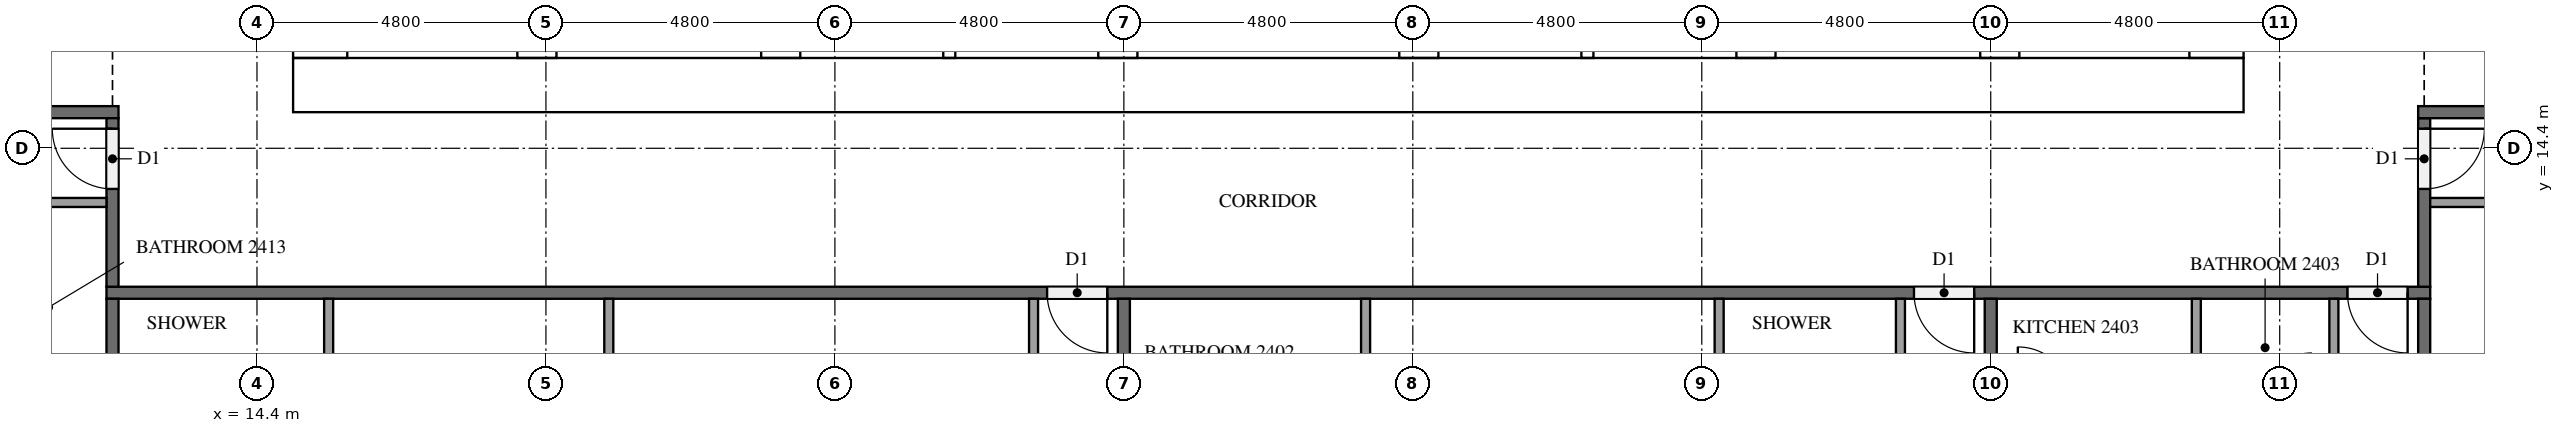
"""IFC4 building model, lengths in metres.
Left out: names, types, materials, properties, quantities, classifications, styles, units other than length and angle.
Written with IfcOpenShell. Run it as: python <this file> out.ifc"""

import sys

from ifc_helpers import new_model, si_unit, direction, frame, frame_2d, origin, place, context, subcontext, project, spatial, rectangle, extrude, element, fill, save


model = new_model("IFC4")
c1 = context("Model", 3, precision=1e-05, world=origin(), true_north=direction((0.0, 1.0)))
c2 = subcontext(c1, "Body", "Model", "MODEL_VIEW")
j1 = project(units=[si_unit("LENGTHUNIT", "METRE"), si_unit("PLANEANGLEUNIT", "RADIAN")], contexts=[c1])
p1 = place(None, origin())
s1 = spatial("IfcSite", under=j1, at=p1, CompositionType="ELEMENT")
p2 = place(p1, origin())
s2 = spatial("IfcBuilding", under=s1, at=p2, CompositionType="ELEMENT")
p3 = place(p2, frame((0.0, 0.0, 96.2)))
s3 = spatial("IfcBuildingStorey", under=s2, at=p3, CompositionType="ELEMENT", Elevation=96.2)
p4 = place(p3, frame((15.0, 15.45, 0.0), z_axis=(0.0, 0.0, 1.0), x_axis=(1.0, 0.0, 0.0)))
e1 = element("IfcWall", 1, at=p4, inside=s3, PredefinedType="SHEAR", context=c2, shape_type="SweptSolid", body=[
    extrude(rectangle(XDim=32.4, YDim=0.9, at=frame_2d((16.2, 0.0))), origin(), (0.0, 0.0, 1.0), 3.2),
])
p5 = place(p4, frame((15.3, 0.0, 0.0)))
e2 = element("IfcOpeningElement", 2, at=p5, cuts=e1, PredefinedType="OPENING", context=c2, shape_type="SweptSolid", body=[
    extrude(rectangle(XDim=1.8, YDim=2.1, at=frame_2d((0.9, 1.05))), frame((0.0, 0.46, 0.0), z_axis=(0.0, -1.0, 0.0), x_axis=(1.0, 0.0, 0.0)), (0.0, 0.0, 1.0), 0.92),
])
p6 = place(p3, frame((15.45, 15.9, 0.0), z_axis=(0.0, 0.0, 1.0), x_axis=(0.0, 1.0, 0.0)))
e3 = element("IfcWall", 3, at=p6, inside=s3, PredefinedType="SHEAR", context=c2, shape_type="SweptSolid", body=[
    extrude(rectangle(XDim=21.0, YDim=0.9, at=frame_2d((10.5, 0.0))), origin(), (0.0, 0.0, 1.0), 3.2),
])
p7 = place(p6, frame((4.86, 0.0, 0.0)))
e4 = element("IfcOpeningElement", 4, at=p7, cuts=e3, PredefinedType="OPENING", context=c2, shape_type="SweptSolid", body=[
    extrude(rectangle(XDim=1.2, YDim=2.1, at=frame_2d((0.6, 1.05))), frame((0.0, 0.46, 0.0), z_axis=(0.0, -1.0, 0.0), x_axis=(1.0, 0.0, 0.0)), (0.0, 0.0, 1.0), 0.92),
])
p8 = place(p3, frame((46.95, 15.9, 0.0), z_axis=(0.0, 0.0, 1.0), x_axis=(0.0, 1.0, 0.0)))
e5 = element("IfcWall", 5, at=p8, inside=s3, PredefinedType="SHEAR", context=c2, shape_type="SweptSolid", body=[
    extrude(rectangle(XDim=21.0, YDim=0.9, at=frame_2d((10.5, 0.0))), origin(), (0.0, 0.0, 1.0), 3.2),
])
p9 = place(p8, frame((10.2, 0.0, 0.0)))
e6 = element("IfcOpeningElement", 6, at=p9, cuts=e5, PredefinedType="OPENING", context=c2, shape_type="SweptSolid", body=[
    extrude(rectangle(XDim=1.2, YDim=2.1, at=frame_2d((0.6, 1.05))), frame((0.0, 0.46, 0.0), z_axis=(0.0, -1.0, 0.0), x_axis=(1.0, 0.0, 0.0)), (0.0, 0.0, 1.0), 0.92),
])
p10 = place(p3, frame((19.05, 15.9, 0.0), z_axis=(0.0, 0.0, 1.0), x_axis=(0.0, 1.0, 0.0)))
e7 = element("IfcWall", 7, at=p10, inside=s3, PredefinedType="SHEAR", context=c2, shape_type="SweptSolid", body=[
    extrude(rectangle(XDim=15.025, YDim=0.65, at=frame_2d((7.513, 0.0))), origin(), (0.0, 0.0, 1.0), 3.2),
])
p11 = place(p10, frame((9.55, 0.0, 0.0)))
e8 = element("IfcOpeningElement", 8, at=p11, cuts=e7, PredefinedType="OPENING", context=c2, shape_type="SweptSolid", body=[
    extrude(rectangle(XDim=1.1, YDim=2.1, at=frame_2d((0.55, 1.05))), frame((0.0, 0.335, 0.0), z_axis=(0.0, -1.0, 0.0), x_axis=(1.0, 0.0, 0.0)), (0.0, 0.0, 1.0), 0.67),
])
p12 = place(p10, frame((13.05, 0.0, 0.0)))
e9 = element("IfcOpeningElement", 9, at=p12, cuts=e7, PredefinedType="OPENING", context=c2, shape_type="SweptSolid", body=[
    extrude(rectangle(XDim=1.1, YDim=2.1, at=frame_2d((0.55, 1.05))), frame((0.0, 0.335, 0.0), z_axis=(0.0, -1.0, 0.0), x_axis=(1.0, 0.0, 0.0)), (0.0, 0.0, 1.0), 0.67),
])
p13 = place(p10, frame((0.3, 0.0, 0.0)))
e10 = element("IfcOpeningElement", 10, at=p13, cuts=e7, PredefinedType="OPENING", context=c2, shape_type="SweptSolid", body=[
    extrude(rectangle(XDim=1.2, YDim=2.1, at=frame_2d((0.6, 1.05))), frame((0.0, 0.335, 0.0), z_axis=(0.0, -1.0, 0.0), x_axis=(1.0, 0.0, 0.0)), (0.0, 0.0, 1.0), 0.67),
])
p14 = place(p3, frame((23.1, 15.9, 0.0), z_axis=(0.0, 0.0, 1.0), x_axis=(0.0, 1.0, 0.0)))
e11 = element("IfcWall", 11, at=p14, inside=s3, PredefinedType="SHEAR", context=c2, shape_type="SweptSolid", body=[
    extrude(rectangle(XDim=21.0, YDim=0.65, at=frame_2d((10.5, 0.0))), origin(), (0.0, 0.0, 1.0), 3.2),
])
p15 = place(p3, frame((39.3, 15.9, 0.0), z_axis=(0.0, 0.0, 1.0), x_axis=(0.0, 1.0, 0.0)))
e12 = element("IfcWall", 12, at=p15, inside=s3, PredefinedType="SHEAR", context=c2, shape_type="SweptSolid", body=[
    extrude(rectangle(XDim=8.35, YDim=0.65, at=frame_2d((4.175, 0.0))), origin(), (0.0, 0.0, 1.0), 3.2),
])
p16 = place(p3, frame((43.35, 15.9, 0.0), z_axis=(0.0, 0.0, 1.0), x_axis=(0.0, 1.0, 0.0)))
e13 = element("IfcWall", 13, at=p16, inside=s3, PredefinedType="SHEAR", context=c2, shape_type="SweptSolid", body=[
    extrude(rectangle(XDim=8.35, YDim=0.65, at=frame_2d((4.175, 0.0))), origin(), (0.0, 0.0, 1.0), 3.2),
])
p17 = place(p16, frame((0.3, 0.0, 0.0)))
e14 = element("IfcOpeningElement", 14, at=p17, cuts=e13, PredefinedType="OPENING", context=c2, shape_type="SweptSolid", body=[
    extrude(rectangle(XDim=1.2, YDim=2.1, at=frame_2d((0.6, 1.05))), frame((0.0, 0.335, 0.0), z_axis=(0.0, -1.0, 0.0), x_axis=(1.0, 0.0, 0.0)), (0.0, 0.0, 1.0), 0.67),
])
for number, where, z_axis, x_axis in (
    (15, (28.7, 15.9, 0.0), (0.0, 0.0, 1.0), (0.0, 1.0, 0.0)),
    (16, (33.7, 15.9, 0.0), (0.0, 0.0, 1.0), (0.0, 1.0, 0.0)),
):
    element("IfcWall", number, at=place(p3, frame(where, z_axis=z_axis, x_axis=x_axis)), inside=s3, PredefinedType="SHEAR", context=c2, shape_type="SweptSolid", body=[
        extrude(rectangle(XDim=2.525, YDim=0.65, at=frame_2d((1.263, 0.0))), origin(), (0.0, 0.0, 1.0), 3.2),
    ])
for number, where, z_axis, x_axis in (
    (17, (25.9, 15.9, 0.0), (0.0, 0.0, 1.0), (0.0, 1.0, 0.0)),
    (18, (36.5, 15.9, 0.0), (0.0, 0.0, 1.0), (0.0, 1.0, 0.0)),
):
    element("IfcWall", number, at=place(p3, frame(where, z_axis=z_axis, x_axis=x_axis)), inside=s3, PredefinedType="SOLIDWALL", context=c2, shape_type="SweptSolid", body=[
        extrude(rectangle(XDim=2.525, YDim=0.2, at=frame_2d((1.263, 0.0))), origin(), (0.0, 0.0, 1.0), 3.2),
    ])
p18 = place(p3, frame((50.5, 12.0, 0.0), z_axis=(0.0, 0.0, 1.0), x_axis=(-1.0, 0.0, 0.0)))
e19 = element("IfcWall", 19, at=p18, inside=s3, PredefinedType="PARTITIONING", context=c2, shape_type="SweptSolid", body=[
    extrude(rectangle(XDim=38.6, YDim=0.2, at=frame_2d((19.3, 0.0))), origin(), (0.0, 0.0, 1.0), 3.2),
])
p19 = place(p18, frame((21.975, 0.0, 0.0)))
e20 = element("IfcOpeningElement", 20, at=p19, cuts=e19, PredefinedType="OPENING", context=c2, shape_type="SweptSolid", body=[
    extrude(rectangle(XDim=1.0, YDim=2.1, at=frame_2d((0.5, 1.05))), frame((0.0, 0.11, 0.0), z_axis=(0.0, -1.0, 0.0), x_axis=(1.0, 0.0, 0.0)), (0.0, 0.0, 1.0), 0.22),
])
p20 = place(p18, frame((7.575, 0.0, 0.0)))
e21 = element("IfcOpeningElement", 21, at=p20, cuts=e19, PredefinedType="OPENING", context=c2, shape_type="SweptSolid", body=[
    extrude(rectangle(XDim=1.0, YDim=2.1, at=frame_2d((0.5, 1.05))), frame((0.0, 0.11, 0.0), z_axis=(0.0, -1.0, 0.0), x_axis=(1.0, 0.0, 0.0)), (0.0, 0.0, 1.0), 0.22),
])
p21 = place(p18, frame((0.375, 0.0, 0.0)))
e22 = element("IfcOpeningElement", 22, at=p21, cuts=e19, PredefinedType="OPENING", context=c2, shape_type="SweptSolid", body=[
    extrude(rectangle(XDim=1.0, YDim=2.1, at=frame_2d((0.5, 1.05))), frame((0.0, 0.11, 0.0), z_axis=(0.0, -1.0, 0.0), x_axis=(1.0, 0.0, 0.0)), (0.0, 0.0, 1.0), 0.22),
])
p22 = place(p3, frame((50.4, 14.9, 0.0), z_axis=(0.0, 0.0, 1.0), x_axis=(0.0, -1.0, 0.0)))
e23 = element("IfcWall", 23, at=p22, inside=s3, PredefinedType="PARTITIONING", context=c2, shape_type="SweptSolid", body=[
    extrude(rectangle(XDim=2.8, YDim=0.2, at=frame_2d((1.4, 0.0))), origin(), (0.0, 0.0, 1.0), 3.2),
])
p23 = place(p22, frame((0.175, 0.0, 0.0)))
e24 = element("IfcOpeningElement", 24, at=p23, cuts=e23, PredefinedType="OPENING", context=c2, shape_type="SweptSolid", body=[
    extrude(rectangle(XDim=1.0, YDim=2.1, at=frame_2d((0.5, 1.05))), frame((0.0, 0.11, 0.0), z_axis=(0.0, -1.0, 0.0), x_axis=(1.0, 0.0, 0.0)), (0.0, 0.0, 1.0), 0.22),
])
p24 = place(p3, frame((50.3, 15.0, 0.0), z_axis=(0.0, 0.0, 1.0), x_axis=(1.0, 0.0, 0.0)))
e25 = element("IfcWall", 25, at=p24, inside=s3, PredefinedType="PARTITIONING", context=c2, shape_type="SweptSolid", body=[
    extrude(rectangle(XDim=2.2, YDim=0.2, at=frame_2d((1.1, 0.0))), origin(), (0.0, 0.0, 1.0), 3.2),
])
p25 = place(p3, frame((9.9, 15.0, 0.0), z_axis=(0.0, 0.0, 1.0), x_axis=(1.0, 0.0, 0.0)))
e26 = element("IfcWall", 26, at=p25, inside=s3, PredefinedType="PARTITIONING", context=c2, shape_type="SweptSolid", body=[
    extrude(rectangle(XDim=2.2, YDim=0.2, at=frame_2d((1.1, 0.0))), origin(), (0.0, 0.0, 1.0), 3.2),
])
p26 = place(p3, frame((12.0, 12.1, 0.0), z_axis=(0.0, 0.0, 1.0), x_axis=(0.0, 1.0, 0.0)))
e27 = element("IfcWall", 27, at=p26, inside=s3, PredefinedType="PARTITIONING", context=c2, shape_type="SweptSolid", body=[
    extrude(rectangle(XDim=2.8, YDim=0.2, at=frame_2d((1.4, 0.0))), origin(), (0.0, 0.0, 1.0), 3.2),
])
p27 = place(p26, frame((1.625, 0.0, 0.0)))
e28 = element("IfcOpeningElement", 28, at=p27, cuts=e27, PredefinedType="OPENING", context=c2, shape_type="SweptSolid", body=[
    extrude(rectangle(XDim=1.0, YDim=2.1, at=frame_2d((0.5, 1.05))), frame((0.0, 0.11, 0.0), z_axis=(0.0, -1.0, 0.0), x_axis=(1.0, 0.0, 0.0)), (0.0, 0.0, 1.0), 0.22),
])
p28 = place(p3, frame((28.8, 11.9, 0.0), z_axis=(0.0, 0.0, 1.0), x_axis=(0.0, -1.0, 0.0)))
e29 = element("IfcWall", 29, at=p28, inside=s3, PredefinedType="PARTITIONING", context=c2, shape_type="SweptSolid", body=[
    extrude(rectangle(XDim=6.675, YDim=0.2, at=frame_2d((3.337, 0.0))), origin(), (0.0, 0.0, 1.0), 3.2),
])
for number, where, z_axis, x_axis in (
    (30, (12.0, 4.9, 0.0), (0.0, 0.0, 1.0), (0.0, 1.0, 0.0)),
    (31, (43.2, 11.9, 0.0), (0.0, 0.0, 1.0), (0.0, -1.0, 0.0)),
    (32, (50.4, 11.9, 0.0), (0.0, 0.0, 1.0), (0.0, -1.0, 0.0)),
):
    element("IfcWall", number, at=place(p3, frame(where, z_axis=z_axis, x_axis=x_axis)), inside=s3, PredefinedType="PARTITIONING", context=c2, shape_type="SweptSolid", body=[
        extrude(rectangle(XDim=7.0, YDim=0.2, at=frame_2d((3.5, 0.0))), origin(), (0.0, 0.0, 1.0), 3.2),
    ])
for number, where, z_axis, x_axis in (
    (33, (20.244, 11.9, 0.0), (0.0, 0.0, 1.0), (0.0, -1.0, 0.0)),
    (34, (15.59, 11.9, 0.0), (0.0, 0.0, 1.0), (0.0, -1.0, 0.0)),
):
    element("IfcWall", number, at=place(p3, frame(where, z_axis=z_axis, x_axis=x_axis)), inside=s3, PredefinedType="PARTITIONING", context=c2, shape_type="SweptSolid", body=[
        extrude(rectangle(XDim=2.225, YDim=0.15, at=frame_2d((1.112, 0.0))), origin(), (0.0, 0.0, 1.0), 3.2),
    ])
p29 = place(p3, frame((27.3, 11.9, 0.0), z_axis=(0.0, 0.0, 1.0), x_axis=(0.0, -1.0, 0.0)))
e35 = element("IfcWall", 35, at=p29, inside=s3, PredefinedType="PARTITIONING", context=c2, shape_type="SweptSolid", body=[
    extrude(rectangle(XDim=2.375, YDim=0.15, at=frame_2d((1.188, 0.0))), origin(), (0.0, 0.0, 1.0), 3.2),
])
for number, where, z_axis, x_axis in (
    (36, (38.688, 11.9, 0.0), (0.0, 0.0, 1.0), (0.0, -1.0, 0.0)),
    (37, (32.815, 11.9, 0.0), (0.0, 0.0, 1.0), (0.0, -1.0, 0.0)),
):
    element("IfcWall", number, at=place(p3, frame(where, z_axis=z_axis, x_axis=x_axis)), inside=s3, PredefinedType="PARTITIONING", context=c2, shape_type="SweptSolid", body=[
        extrude(rectangle(XDim=2.225, YDim=0.15, at=frame_2d((1.112, 0.0))), origin(), (0.0, 0.0, 1.0), 3.2),
    ])
p30 = place(p3, frame((41.7, 11.9, 0.0), z_axis=(0.0, 0.0, 1.0), x_axis=(0.0, -1.0, 0.0)))
e38 = element("IfcWall", 38, at=p30, inside=s3, PredefinedType="PARTITIONING", context=c2, shape_type="SweptSolid", body=[
    extrude(rectangle(XDim=2.375, YDim=0.15, at=frame_2d((1.188, 0.0))), origin(), (0.0, 0.0, 1.0), 3.2),
])
p31 = place(p3, frame((46.615, 11.9, 0.0), z_axis=(0.0, 0.0, 1.0), x_axis=(0.0, -1.0, 0.0)))
e39 = element("IfcWall", 39, at=p31, inside=s3, PredefinedType="PARTITIONING", context=c2, shape_type="SweptSolid", body=[
    extrude(rectangle(XDim=1.625, YDim=0.15, at=frame_2d((0.812, 0.0))), origin(), (0.0, 0.0, 1.0), 3.2),
])
p32 = place(p3, frame((48.9, 11.9, 0.0), z_axis=(0.0, 0.0, 1.0), x_axis=(0.0, -1.0, 0.0)))
e40 = element("IfcWall", 40, at=p32, inside=s3, PredefinedType="PARTITIONING", context=c2, shape_type="SweptSolid", body=[
    extrude(rectangle(XDim=1.775, YDim=0.15, at=frame_2d((0.887, 0.0))), origin(), (0.0, 0.0, 1.0), 3.2),
])
p33 = place(p3, frame((50.5, 13.5, 0.0), z_axis=(0.0, 0.0, 1.0), x_axis=(1.0, 0.0, 0.0)))
e41 = element("IfcWall", 41, at=p33, inside=s3, PredefinedType="PARTITIONING", context=c2, shape_type="SweptSolid", body=[
    extrude(rectangle(XDim=3.125, YDim=0.15, at=frame_2d((1.562, 0.0))), origin(), (0.0, 0.0, 1.0), 3.2),
])
p34 = place(p3, frame((11.9, 13.5, 0.0), z_axis=(0.0, 0.0, 1.0), x_axis=(-1.0, 0.0, 0.0)))
e42 = element("IfcWall", 42, at=p34, inside=s3, PredefinedType="PARTITIONING", context=c2, shape_type="SweptSolid", body=[
    extrude(rectangle(XDim=2.075, YDim=0.15, at=frame_2d((1.038, 0.0))), origin(), (0.0, 0.0, 1.0), 3.2),
])
p35 = place(p5, frame((1.8, 0.0, 0.0), z_axis=(0.0, 0.0, 1.0), x_axis=(-1.0, 0.0, 0.0)))
e43 = element("IfcDoor", 43, at=p35, inside=s3, OperationType="DOUBLE_DOOR_SINGLE_SWING", PredefinedType="DOOR", context=c2, shape_type="SweptSolid", body=[
    extrude(rectangle(XDim=1.8, YDim=2.1, at=frame_2d((0.9, 1.05))), frame((0.0, 0.025, 0.0), z_axis=(0.0, -1.0, 0.0), x_axis=(1.0, 0.0, 0.0)), (0.0, 0.0, 1.0), 0.05),
])
fill(e2, e43)
p36 = place(p19, origin())
e44 = element("IfcDoor", 44, at=p36, inside=s3, OperationType="SINGLE_SWING_LEFT", PredefinedType="DOOR", context=c2, shape_type="SweptSolid", body=[
    extrude(rectangle(XDim=1.0, YDim=2.1, at=frame_2d((0.5, 1.05))), frame((0.0, 0.025, 0.0), z_axis=(0.0, -1.0, 0.0), x_axis=(1.0, 0.0, 0.0)), (0.0, 0.0, 1.0), 0.05),
])
fill(e20, e44)
p37 = place(p20, origin())
e45 = element("IfcDoor", 45, at=p37, inside=s3, OperationType="SINGLE_SWING_LEFT", PredefinedType="DOOR", context=c2, shape_type="SweptSolid", body=[
    extrude(rectangle(XDim=1.0, YDim=2.1, at=frame_2d((0.5, 1.05))), frame((0.0, 0.025, 0.0), z_axis=(0.0, -1.0, 0.0), x_axis=(1.0, 0.0, 0.0)), (0.0, 0.0, 1.0), 0.05),
])
fill(e21, e45)
p38 = place(p21, origin())
e46 = element("IfcDoor", 46, at=p38, inside=s3, OperationType="SINGLE_SWING_LEFT", PredefinedType="DOOR", context=c2, shape_type="SweptSolid", body=[
    extrude(rectangle(XDim=1.0, YDim=2.1, at=frame_2d((0.5, 1.05))), frame((0.0, 0.025, 0.0), z_axis=(0.0, -1.0, 0.0), x_axis=(1.0, 0.0, 0.0)), (0.0, 0.0, 1.0), 0.05),
])
fill(e22, e46)
p39 = place(p23, origin())
e47 = element("IfcDoor", 47, at=p39, inside=s3, OperationType="SINGLE_SWING_LEFT", PredefinedType="DOOR", context=c2, shape_type="SweptSolid", body=[
    extrude(rectangle(XDim=1.0, YDim=2.1, at=frame_2d((0.5, 1.05))), frame((0.0, 0.025, 0.0), z_axis=(0.0, -1.0, 0.0), x_axis=(1.0, 0.0, 0.0)), (0.0, 0.0, 1.0), 0.05),
])
fill(e24, e47)
p40 = place(p27, origin())
e48 = element("IfcDoor", 48, at=p40, inside=s3, OperationType="SINGLE_SWING_RIGHT", PredefinedType="DOOR", context=c2, shape_type="SweptSolid", body=[
    extrude(rectangle(XDim=1.0, YDim=2.1, at=frame_2d((0.5, 1.05))), frame((0.0, 0.025, 0.0), z_axis=(0.0, -1.0, 0.0), x_axis=(1.0, 0.0, 0.0)), (0.0, 0.0, 1.0), 0.05),
])
fill(e28, e48)
save(model, sys.argv[1])
